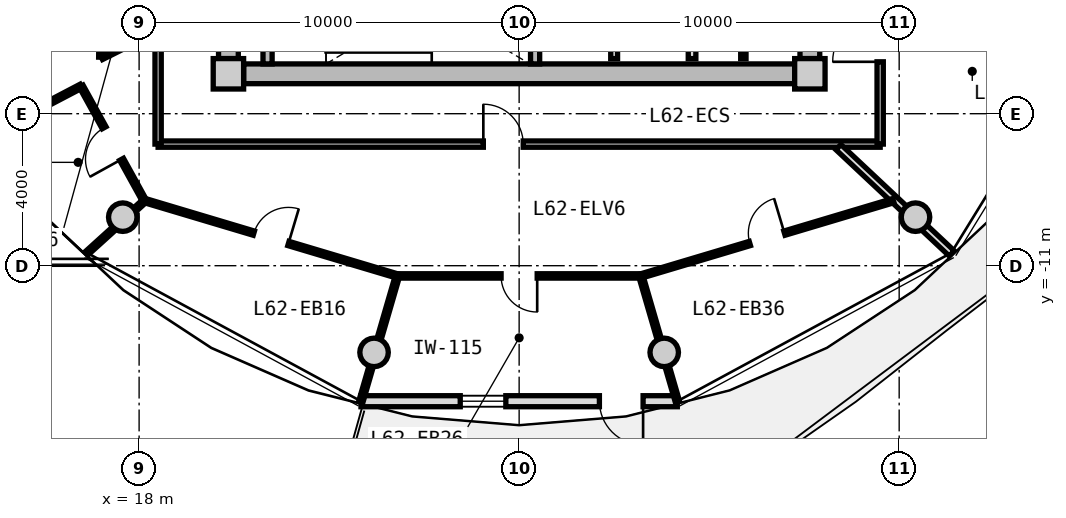
"""IFC4 building model, lengths in metres.
Left out: names, types, materials, properties, quantities, classifications, styles, units other than length and angle.
Written with IfcOpenShell. Run it as: python <this file> out.ifc"""

import sys

from ifc_helpers import new_model, si_unit, direction, frame, frame_2d, origin, origin_2d, place, context, subcontext, project, spatial, rectangle, circle, extrude, source, transform, mapped, element, fill, save


model = new_model("IFC4")
c1 = context("Model", 3, precision=1e-05, world=origin(), true_north=direction((0.0, 1.0)))
c2 = subcontext(c1, "Body", "Model", "MODEL_VIEW")
j1 = project(units=[si_unit("LENGTHUNIT", "METRE"), si_unit("PLANEANGLEUNIT", "RADIAN")], contexts=[c1])
p1 = place(None, origin())
s1 = spatial("IfcSite", under=j1, at=p1, CompositionType="ELEMENT")
p2 = place(p1, origin())
s2 = spatial("IfcBuilding", under=s1, at=p2, CompositionType="ELEMENT")
p3 = place(p2, frame((0.0, 0.0, 199.8)))
s3 = spatial("IfcBuildingStorey", under=s2, at=p3, CompositionType="ELEMENT", Elevation=199.8)
m1 = source(origin(), c2, "Body", "SweptSolid", [
    extrude(rectangle(XDim=0.8, YDim=0.8, at=origin_2d()), origin(), (0.0, 0.0, 1.0), 4.0),
])
for number, where, z_axis, x_axis in (
    (1, (20.35, -5.95, 0.0), (0.0, 0.0, 1.0), (1.0, 0.0, 0.0)),
    (2, (35.65, -5.95, 0.0), (0.0, 0.0, 1.0), (1.0, 0.0, 0.0)),
):
    element("IfcColumn", number, at=place(p3, frame(where, z_axis=z_axis, x_axis=x_axis)), inside=s3, PredefinedType="COLUMN", context=c2, shape_type="MappedRepresentation", body=[
        mapped(m1, transform((0.0, 0.0, 0.0), x_axis=(1.0, 0.0, 0.0), y_axis=(0.0, 1.0, 0.0), z_axis=(0.0, 0.0, 1.0), scale=1.0)),
    ])
m2 = source(origin(), c2, "Body", "SweptSolid", [
    extrude(rectangle(XDim=14.5, YDim=0.52, at=frame_2d((7.25, 0.0))), origin(), (0.0, 0.0, 1.0), 3.71),
])
p4 = place(p3, frame((35.25, -5.95, 0.0), z_axis=(0.0, 0.0, 1.0), x_axis=(-1.0, 0.0, 0.0)))
e3 = element("IfcWall", 3, at=p4, inside=s3, PredefinedType="SHEAR", context=c2, shape_type="MappedRepresentation", body=[
    mapped(m2, transform((0.0, 0.0, 0.0), x_axis=(1.0, 0.0, 0.0), y_axis=(0.0, 1.0, 0.0), z_axis=(0.0, 0.0, 1.0), scale=1.0)),
])
m3 = source(origin(), c2, "Body", "SweptSolid", [
    extrude(rectangle(XDim=11.1, YDim=0.52, at=frame_2d((5.55, 0.0))), origin(), (0.0, 0.0, 1.0), 3.71),
])
p5 = place(p3, frame((20.35, -5.55, 0.0), z_axis=(0.0, 0.0, 1.0), x_axis=(0.0, 1.0, 0.0)))
e4 = element("IfcWall", 4, at=p5, inside=s3, PredefinedType="SHEAR", context=c2, shape_type="MappedRepresentation", body=[
    mapped(m3, transform((0.0, 0.0, 0.0), x_axis=(1.0, 0.0, 0.0), y_axis=(0.0, 1.0, 0.0), z_axis=(0.0, 0.0, 1.0), scale=1.0)),
])
p6 = place(p5, frame((3.8, 0.0, 0.0)))
e5 = element("IfcOpeningElement", 5, at=p6, cuts=e4, PredefinedType="OPENING", context=c2, shape_type="SweptSolid", body=[
    extrude(rectangle(XDim=1.2, YDim=2.15, at=frame_2d((0.6, 1.075))), frame((0.0, 0.27, 0.0), z_axis=(0.0, -1.0, 0.0), x_axis=(1.0, 0.0, 0.0)), (0.0, 0.0, 1.0), 0.54),
])
p7 = place(p3, frame((35.65, 5.55, 0.0), z_axis=(0.0, 0.0, 1.0), x_axis=(0.0, -1.0, 0.0)))
e6 = element("IfcWall", 6, at=p7, inside=s3, PredefinedType="SHEAR", context=c2, shape_type="MappedRepresentation", body=[
    mapped(m3, transform((0.0, 0.0, 0.0), x_axis=(1.0, 0.0, 0.0), y_axis=(0.0, 1.0, 0.0), z_axis=(0.0, 0.0, 1.0), scale=1.0)),
])
p8 = place(p7, frame((5.65, 0.0, 0.0)))
e7 = element("IfcOpeningElement", 7, at=p8, cuts=e6, PredefinedType="OPENING", context=c2, shape_type="SweptSolid", body=[
    extrude(rectangle(XDim=1.2, YDim=2.15, at=frame_2d((0.6, 1.075))), frame((0.0, 0.27, 0.0), z_axis=(0.0, -1.0, 0.0), x_axis=(1.0, 0.0, 0.0)), (0.0, 0.0, 1.0), 0.54),
])
m4 = source(origin(), c2, "Body", "SweptSolid", [
    extrude(circle(Radius=0.375, at=origin_2d()), origin(), (0.0, 0.0, 1.0), 4.0),
])
for number, where, z_axis, x_axis in (
    (8, (17.57, -9.723, 0.0), (0.0, 0.0, 1.0), (1.0, 0.0, 0.0)),
    (9, (24.182, -13.281, 0.0), (0.0, 0.0, 1.0), (1.0, 0.0, 0.0)),
    (10, (31.818, -13.281, 0.0), (0.0, 0.0, 1.0), (1.0, 0.0, 0.0)),
    (11, (38.43, -9.723, 0.0), (0.0, 0.0, 1.0), (1.0, 0.0, 0.0)),
):
    element("IfcColumn", number, at=place(p3, frame(where, z_axis=z_axis, x_axis=x_axis)), inside=s3, PredefinedType="COLUMN", context=c2, shape_type="MappedRepresentation", body=[
        mapped(m4, transform((0.0, 0.0, 0.0), x_axis=(1.0, 0.0, 0.0), y_axis=(0.0, 1.0, 0.0), z_axis=(0.0, 0.0, 1.0), scale=1.0)),
    ])
m5 = source(origin(), c2, "Body", "SweptSolid", [
    extrude(rectangle(XDim=8.324, YDim=0.29, at=frame_2d((4.162, 0.0))), origin(), (0.0, 0.0, 1.0), 3.71),
])
p9 = place(p3, frame((32.162, -14.566, 0.0), z_axis=(0.0, 0.0, 1.0), x_axis=(-1.0, 0.0, 0.0)))
e12 = element("IfcWall", 12, at=p9, inside=s3, PredefinedType="SOLIDWALL", context=c2, shape_type="MappedRepresentation", body=[
    mapped(m5, transform((0.0, 0.0, 0.0), x_axis=(1.0, 0.0, 0.0), y_axis=(0.0, 1.0, 0.0), z_axis=(0.0, 0.0, 1.0), scale=1.0)),
])
p10 = place(p9, frame((0.9, 0.0, 0.0)))
e13 = element("IfcOpeningElement", 13, at=p10, cuts=e12, PredefinedType="OPENING", context=c2, shape_type="SweptSolid", body=[
    extrude(rectangle(XDim=1.15, YDim=2.25, at=frame_2d((0.575, 1.125))), frame((0.0, 0.155, 0.0), z_axis=(0.0, -1.0, 0.0), x_axis=(1.0, 0.0, 0.0)), (0.0, 0.0, 1.0), 0.31),
])
p11 = place(p9, frame((4.512, 0.0, 0.85)))
e14 = element("IfcOpeningElement", 14, at=p11, cuts=e12, PredefinedType="OPENING", context=c2, shape_type="SweptSolid", body=[
    extrude(rectangle(XDim=1.2, YDim=1.5, at=frame_2d((0.6, 0.75))), frame((0.0, 0.155, 0.0), z_axis=(0.0, -1.0, 0.0), x_axis=(1.0, 0.0, 0.0)), (0.0, 0.0, 1.0), 0.31),
])
m6 = source(origin(), c2, "Body", "SweptSolid", [
    extrude(rectangle(XDim=3.24, YDim=0.24, at=frame_2d((1.62, 0.0))), origin(), (0.0, 0.0, 1.0), 3.71),
])
for number, where, z_axis, x_axis in (
    (15, (21.38, -5.69, 0.0), (0.0, 0.0, 1.0), (0.0, 1.0, 0.0)),
    (16, (28.42, -5.69, 0.0), (0.0, 0.0, 1.0), (0.0, 1.0, 0.0)),
):
    element("IfcWall", number, at=place(p3, frame(where, z_axis=z_axis, x_axis=x_axis)), inside=s3, PredefinedType="PARTITIONING", context=c2, shape_type="MappedRepresentation", body=[
        mapped(m6, transform((0.0, 0.0, 0.0), x_axis=(1.0, 0.0, 0.0), y_axis=(0.0, 1.0, 0.0), z_axis=(0.0, 0.0, 1.0), scale=1.0)),
    ])
m7 = source(origin(), c2, "Body", "SweptSolid", [
    extrude(rectangle(XDim=3.8, YDim=0.2, at=frame_2d((1.9, 0.0))), origin(), (0.0, 0.0, 1.0), 3.695),
])
p12 = place(p3, frame((32.55, -5.55, 0.0), z_axis=(0.0, 0.0, 1.0), x_axis=(0.0, 1.0, 0.0)))
e17 = element("IfcWall", 17, at=p12, inside=s3, PredefinedType="PARTITIONING", context=c2, shape_type="MappedRepresentation", body=[
    mapped(m7, transform((0.0, 0.0, 0.0), x_axis=(1.0, 0.0, 0.0), y_axis=(0.0, 1.0, 0.0), z_axis=(0.0, 0.0, 1.0), scale=1.0)),
])
m8 = source(origin(), c2, "Body", "SweptSolid", [
    extrude(rectangle(XDim=4.2, YDim=0.18, at=frame_2d((2.1, 0.0))), origin(), (0.0, 0.0, 1.0), 3.695),
])
p13 = place(p3, frame((30.5, -5.55, 0.0), z_axis=(0.0, 0.0, 1.0), x_axis=(0.0, 1.0, 0.0)))
e18 = element("IfcWall", 18, at=p13, inside=s3, PredefinedType="PARTITIONING", context=c2, shape_type="MappedRepresentation", body=[
    mapped(m8, transform((0.0, 0.0, 0.0), x_axis=(1.0, 0.0, 0.0), y_axis=(0.0, 1.0, 0.0), z_axis=(0.0, 0.0, 1.0), scale=1.0)),
])
m9 = source(origin(), c2, "Body", "SweptSolid", [
    extrude(rectangle(XDim=3.8, YDim=0.14, at=frame_2d((1.9, 0.0))), origin(), (0.0, 0.0, 1.0), 3.695),
])
p14 = place(p3, frame((33.9, -5.55, 0.0), z_axis=(0.0, 0.0, 1.0), x_axis=(0.0, 1.0, 0.0)))
e19 = element("IfcWall", 19, at=p14, inside=s3, PredefinedType="PARTITIONING", context=c2, shape_type="MappedRepresentation", body=[
    mapped(m9, transform((0.0, 0.0, 0.0), x_axis=(1.0, 0.0, 0.0), y_axis=(0.0, 1.0, 0.0), z_axis=(0.0, 0.0, 1.0), scale=1.0)),
])
m10 = source(origin(), c2, "Body", "SweptSolid", [
    extrude(rectangle(XDim=19.0, YDim=0.165, at=frame_2d((9.5, 0.0))), origin(), (0.0, 0.0, 1.0), 3.695),
])
p15 = place(p3, frame((37.5, -7.8, 0.0), z_axis=(0.0, 0.0, 1.0), x_axis=(-1.0, 0.0, 0.0)))
e20 = element("IfcWall", 20, at=p15, inside=s3, PredefinedType="PARTITIONING", context=c2, shape_type="MappedRepresentation", body=[
    mapped(m10, transform((0.0, 0.0, 0.0), x_axis=(1.0, 0.0, 0.0), y_axis=(0.0, 1.0, 0.0), z_axis=(0.0, 0.0, 1.0), scale=1.0)),
])
p16 = place(p15, frame((9.392, 0.0, 0.0)))
e21 = element("IfcOpeningElement", 21, at=p16, cuts=e20, PredefinedType="OPENING", context=c2, shape_type="SweptSolid", body=[
    extrude(rectangle(XDim=1.05, YDim=2.15, at=frame_2d((0.525, 1.075))), frame((0.0, 0.093, 0.0), z_axis=(0.0, -1.0, 0.0), x_axis=(1.0, 0.0, 0.0)), (0.0, 0.0, 1.0), 0.185),
])
m11 = source(origin(), c2, "Body", "SweptSolid", [
    extrude(rectangle(XDim=6.88, YDim=0.165, at=frame_2d((3.44, 0.0))), origin(), (0.0, 0.0, 1.0), 3.695),
])
p17 = place(p3, frame((18.5, -7.8, 0.0), z_axis=(0.0, 0.0, 1.0), x_axis=(0.0, 1.0, 0.0)))
e22 = element("IfcWall", 22, at=p17, inside=s3, PredefinedType="PARTITIONING", context=c2, shape_type="MappedRepresentation", body=[
    mapped(m11, transform((0.0, 0.0, 0.0), x_axis=(1.0, 0.0, 0.0), y_axis=(0.0, 1.0, 0.0), z_axis=(0.0, 0.0, 1.0), scale=1.0)),
])
p18 = place(p3, frame((37.5, -0.92, 0.0), z_axis=(0.0, 0.0, 1.0), x_axis=(0.0, -1.0, 0.0)))
e23 = element("IfcWall", 23, at=p18, inside=s3, PredefinedType="PARTITIONING", context=c2, shape_type="MappedRepresentation", body=[
    mapped(m11, transform((0.0, 0.0, 0.0), x_axis=(1.0, 0.0, 0.0), y_axis=(0.0, 1.0, 0.0), z_axis=(0.0, 0.0, 1.0), scale=1.0)),
])
p19 = place(p18, frame((3.464, 0.0, 0.0)))
e24 = element("IfcOpeningElement", 24, at=p19, cuts=e23, PredefinedType="OPENING", context=c2, shape_type="SweptSolid", body=[
    extrude(rectangle(XDim=1.25, YDim=2.2, at=frame_2d((0.625, 1.1))), frame((0.0, 0.093, 0.0), z_axis=(0.0, -1.0, 0.0), x_axis=(1.0, 0.0, 0.0)), (0.0, 0.0, 1.0), 0.185),
])
m12 = source(origin(), c2, "Body", "SweptSolid", [
    extrude(rectangle(XDim=4.089, YDim=0.19, at=frame_2d((2.044, 0.0))), origin(), (0.0, 0.0, 1.0), 3.295),
])
p20 = place(p3, frame((36.402, -7.88, 0.0), z_axis=(0.0, 0.0, 1.0), x_axis=(0.729401273609, -0.684086092577, 0.0)))
e25 = element("IfcWall", 25, at=p20, inside=s3, PredefinedType="PARTITIONING", context=c2, shape_type="MappedRepresentation", body=[
    mapped(m12, transform((0.0, 0.0, 0.0), x_axis=(1.0, 0.0, 0.0), y_axis=(0.0, 1.0, 0.0), z_axis=(0.0, 0.0, 1.0), scale=1.0)),
])
m13 = source(origin(), c2, "Body", "SweptSolid", [
    extrude(rectangle(XDim=6.936, YDim=0.115, at=frame_2d((3.468, 0.0))), origin(), (0.0, 0.0, 1.0), 3.695),
])
p21 = place(p3, frame((18.151, -9.287, 0.0), z_axis=(0.0, 0.0, 1.0), x_axis=(0.958186895835, -0.286143098205, 0.0)))
e26 = element("IfcWall", 26, at=p21, inside=s3, PredefinedType="PARTITIONING", context=c2, shape_type="MappedRepresentation", body=[
    mapped(m13, transform((0.0, 0.0, 0.0), x_axis=(1.0, 0.0, 0.0), y_axis=(0.0, 1.0, 0.0), z_axis=(0.0, 0.0, 1.0), scale=1.0)),
])
p22 = place(p21, frame((2.993, 0.0, 0.0)))
e27 = element("IfcOpeningElement", 27, at=p22, cuts=e26, PredefinedType="OPENING", context=c2, shape_type="SweptSolid", body=[
    extrude(rectangle(XDim=0.95, YDim=2.1, at=frame_2d((0.475, 1.05))), frame((0.0, 0.067, 0.0), z_axis=(0.0, -1.0, 0.0), x_axis=(1.0, 0.0, 0.0)), (0.0, 0.0, 1.0), 0.135),
])
m14 = source(origin(), c2, "Body", "SweptSolid", [
    extrude(rectangle(XDim=2.072, YDim=0.115, at=frame_2d((1.036, 0.0))), origin(), (0.0, 0.0, 1.0), 3.295),
])
p23 = place(p3, frame((18.151, -9.287, 0.0), z_axis=(0.0, 0.0, 1.0), x_axis=(-0.741410125356, -0.671052178314, 0.0)))
e28 = element("IfcWall", 28, at=p23, inside=s3, PredefinedType="PARTITIONING", context=c2, shape_type="MappedRepresentation", body=[
    mapped(m14, transform((0.0, 0.0, 0.0), x_axis=(1.0, 0.0, 0.0), y_axis=(0.0, 1.0, 0.0), z_axis=(0.0, 0.0, 1.0), scale=1.0)),
])
m15 = source(origin(), c2, "Body", "SweptSolid", [
    extrude(rectangle(XDim=6.404, YDim=0.115, at=frame_2d((3.202, 0.0))), origin(), (0.0, 0.0, 1.0), 3.695),
])
p24 = place(p3, frame((24.798, -11.269, 0.0), z_axis=(0.0, 0.0, 1.0), x_axis=(1.0, 0.0, 0.0)))
e29 = element("IfcWall", 29, at=p24, inside=s3, PredefinedType="PARTITIONING", context=c2, shape_type="MappedRepresentation", body=[
    mapped(m15, transform((0.0, 0.0, 0.0), x_axis=(1.0, 0.0, 0.0), y_axis=(0.0, 1.0, 0.0), z_axis=(0.0, 0.0, 1.0), scale=1.0)),
])
p25 = place(p24, frame((2.727, 0.0, 0.0)))
e30 = element("IfcOpeningElement", 30, at=p25, cuts=e29, PredefinedType="OPENING", context=c2, shape_type="SweptSolid", body=[
    extrude(rectangle(XDim=0.95, YDim=2.1, at=frame_2d((0.475, 1.05))), frame((0.0, 0.067, 0.0), z_axis=(0.0, -1.0, 0.0), x_axis=(1.0, 0.0, 0.0)), (0.0, 0.0, 1.0), 0.135),
])
m16 = source(origin(), c2, "Body", "SweptSolid", [
    extrude(rectangle(XDim=3.454, YDim=0.115, at=frame_2d((1.727, 0.0))), origin(), (0.0, 0.0, 1.0), 3.295),
])
p26 = place(p3, frame((24.798, -11.269, 0.0), z_axis=(0.0, 0.0, 1.0), x_axis=(-0.279348499358, -0.960189781193, 0.0)))
e31 = element("IfcWall", 31, at=p26, inside=s3, PredefinedType="PARTITIONING", context=c2, shape_type="MappedRepresentation", body=[
    mapped(m16, transform((0.0, 0.0, 0.0), x_axis=(1.0, 0.0, 0.0), y_axis=(0.0, 1.0, 0.0), z_axis=(0.0, 0.0, 1.0), scale=1.0)),
])
p27 = place(p3, frame((31.203, -11.272, 0.0), z_axis=(0.0, 0.0, 1.0), x_axis=(0.958186895835, 0.286143098205, 0.0)))
e32 = element("IfcWall", 32, at=p27, inside=s3, PredefinedType="PARTITIONING", context=c2, shape_type="MappedRepresentation", body=[
    mapped(m13, transform((0.0, 0.0, 0.0), x_axis=(1.0, 0.0, 0.0), y_axis=(0.0, 1.0, 0.0), z_axis=(0.0, 0.0, 1.0), scale=1.0)),
])
p28 = place(p27, frame((2.993, 0.0, 0.0)))
e33 = element("IfcOpeningElement", 33, at=p28, cuts=e32, PredefinedType="OPENING", context=c2, shape_type="SweptSolid", body=[
    extrude(rectangle(XDim=0.95, YDim=2.1, at=frame_2d((0.475, 1.05))), frame((0.0, 0.067, 0.0), z_axis=(0.0, -1.0, 0.0), x_axis=(1.0, 0.0, 0.0)), (0.0, 0.0, 1.0), 0.135),
])
m17 = source(origin(), c2, "Body", "SweptSolid", [
    extrude(rectangle(XDim=3.451, YDim=0.115, at=frame_2d((1.726, 0.0))), origin(), (0.0, 0.0, 1.0), 3.295),
])
p29 = place(p3, frame((31.203, -11.272, 0.0), z_axis=(0.0, 0.0, 1.0), x_axis=(0.279361559083, -0.960185981624, 0.0)))
e34 = element("IfcWall", 34, at=p29, inside=s3, PredefinedType="PARTITIONING", context=c2, shape_type="MappedRepresentation", body=[
    mapped(m17, transform((0.0, 0.0, 0.0), x_axis=(1.0, 0.0, 0.0), y_axis=(0.0, 1.0, 0.0), z_axis=(0.0, 0.0, 1.0), scale=1.0)),
])
m18 = source(origin(), c2, "Body", "SweptSolid", [
    extrude(rectangle(XDim=1.638, YDim=0.14, at=frame_2d((0.819, 0.0))), origin(), (0.0, 0.0, 1.0), 3.695),
])
p30 = place(p3, frame((18.47, -4.778, 0.0), z_axis=(0.0, 0.0, 1.0), x_axis=(-0.893919977945, -0.448226586707, 0.0)))
e35 = element("IfcWall", 35, at=p30, inside=s3, PredefinedType="PARTITIONING", context=c2, shape_type="MappedRepresentation", body=[
    mapped(m18, transform((0.0, 0.0, 0.0), x_axis=(1.0, 0.0, 0.0), y_axis=(0.0, 1.0, 0.0), z_axis=(0.0, 0.0, 1.0), scale=1.0)),
])
m19 = source(origin(), c2, "Body", "SweptSolid", [
    extrude(rectangle(XDim=2.759, YDim=0.14, at=frame_2d((1.379, 0.0))), origin(), (0.0, 0.0, 1.0), 3.695),
])
p31 = place(p3, frame((17.005, -5.513, 0.0), z_axis=(0.0, 0.0, 1.0), x_axis=(0.01194710728, 0.999928630767, 0.0)))
e36 = element("IfcWall", 36, at=p31, inside=s3, PredefinedType="PARTITIONING", context=c2, shape_type="MappedRepresentation", body=[
    mapped(m19, transform((0.0, 0.0, 0.0), x_axis=(1.0, 0.0, 0.0), y_axis=(0.0, 1.0, 0.0), z_axis=(0.0, 0.0, 1.0), scale=1.0)),
])
p32 = place(p31, frame((0.919, 0.0, 0.0)))
e37 = element("IfcOpeningElement", 37, at=p32, cuts=e36, PredefinedType="OPENING", context=c2, shape_type="SweptSolid", body=[
    extrude(rectangle(XDim=0.92, YDim=2.1, at=frame_2d((0.46, 1.05))), frame((0.0, 0.08, 0.0), z_axis=(0.0, -1.0, 0.0), x_axis=(1.0, 0.0, 0.0)), (0.0, 0.0, 1.0), 0.16),
])
m20 = source(origin(), c2, "Body", "SweptSolid", [
    extrude(rectangle(XDim=2.193, YDim=0.115, at=frame_2d((1.097, 0.0))), origin(), (0.0, 0.0, 1.0), 3.695),
])
p33 = place(p3, frame((16.475, -6.275, 0.0), z_axis=(0.0, 0.0, 1.0), x_axis=(-0.885783595046, -0.464098505435, 0.0)))
e38 = element("IfcWall", 38, at=p33, inside=s3, PredefinedType="PARTITIONING", context=c2, shape_type="MappedRepresentation", body=[
    mapped(m20, transform((0.0, 0.0, 0.0), x_axis=(1.0, 0.0, 0.0), y_axis=(0.0, 1.0, 0.0), z_axis=(0.0, 0.0, 1.0), scale=1.0)),
])
m21 = source(origin(), c2, "Body", "SweptSolid", [
    extrude(rectangle(XDim=3.45, YDim=0.115, at=frame_2d((1.725, 0.0))), origin(), (0.0, 0.0, 1.0), 3.695),
])
p34 = place(p3, frame((16.475, -6.275, 0.0), z_axis=(0.0, 0.0, 1.0), x_axis=(0.483659007882, -0.875256513312, 0.0)))
e39 = element("IfcWall", 39, at=p34, inside=s3, PredefinedType="PARTITIONING", context=c2, shape_type="MappedRepresentation", body=[
    mapped(m21, transform((0.0, 0.0, 0.0), x_axis=(1.0, 0.0, 0.0), y_axis=(0.0, 1.0, 0.0), z_axis=(0.0, 0.0, 1.0), scale=1.0)),
])
p35 = place(p34, frame((1.25, 0.0, 0.0)))
e40 = element("IfcOpeningElement", 40, at=p35, cuts=e39, PredefinedType="OPENING", context=c2, shape_type="SweptSolid", body=[
    extrude(rectangle(XDim=0.95, YDim=2.1, at=frame_2d((0.475, 1.05))), frame((0.0, 0.067, 0.0), z_axis=(0.0, -1.0, 0.0), x_axis=(1.0, 0.0, 0.0)), (0.0, 0.0, 1.0), 0.135),
])
m22 = source(origin(), c2, "Body", "SweptSolid", [
    extrude(rectangle(XDim=1.15, YDim=2.25, at=frame_2d((0.575, 1.125))), frame((0.0, 0.025, 0.0), z_axis=(0.0, -1.0, 0.0), x_axis=(1.0, 0.0, 0.0)), (0.0, 0.0, 1.0), 0.05),
])
p36 = place(p10, origin())
e41 = element("IfcDoor", 41, at=p36, inside=s3, OperationType="SINGLE_SWING_LEFT", PredefinedType="DOOR", context=c2, shape_type="MappedRepresentation", body=[
    mapped(m22, transform((0.0, 0.0, 0.0), x_axis=(1.0, 0.0, 0.0), y_axis=(0.0, 1.0, 0.0), z_axis=(0.0, 0.0, 1.0), scale=1.0)),
])
fill(e13, e41)
m23 = source(origin(), c2, "Body", "SweptSolid", [
    extrude(rectangle(XDim=1.2, YDim=1.5, at=frame_2d((0.6, 0.75))), frame((0.0, 0.03, 0.0), z_axis=(0.0, -1.0, 0.0), x_axis=(1.0, 0.0, 0.0)), (0.0, 0.0, 1.0), 0.06),
])
p37 = place(p11, origin())
e42 = element("IfcWindow", 42, at=p37, inside=s3, PartitioningType="SINGLE_PANEL", PredefinedType="WINDOW", context=c2, shape_type="MappedRepresentation", body=[
    mapped(m23, transform((0.0, 0.0, 0.0), x_axis=(1.0, 0.0, 0.0), y_axis=(0.0, 1.0, 0.0), z_axis=(0.0, 0.0, 1.0), scale=1.0)),
])
fill(e14, e42)
m24 = source(origin(), c2, "Body", "SweptSolid", [
    extrude(rectangle(XDim=1.05, YDim=2.15, at=frame_2d((0.525, 1.075))), frame((0.0, 0.025, 0.0), z_axis=(0.0, -1.0, 0.0), x_axis=(1.0, 0.0, 0.0)), (0.0, 0.0, 1.0), 0.05),
])
p38 = place(p16, frame((1.05, 0.0, 0.0), z_axis=(0.0, 0.0, 1.0), x_axis=(-1.0, 0.0, 0.0)))
e43 = element("IfcDoor", 43, at=p38, inside=s3, OperationType="SINGLE_SWING_LEFT", PredefinedType="DOOR", context=c2, shape_type="MappedRepresentation", body=[
    mapped(m24, transform((0.0, 0.0, 0.0), x_axis=(1.0, 0.0, 0.0), y_axis=(0.0, 1.0, 0.0), z_axis=(0.0, 0.0, 1.0), scale=1.0)),
])
fill(e21, e43)
m25 = source(origin(), c2, "Body", "SweptSolid", [
    extrude(rectangle(XDim=0.95, YDim=2.1, at=frame_2d((0.475, 1.05))), frame((0.0, 0.025, 0.0), z_axis=(0.0, -1.0, 0.0), x_axis=(1.0, 0.0, 0.0)), (0.0, 0.0, 1.0), 0.05),
])
p39 = place(p35, frame((0.95, 0.0, 0.0), z_axis=(0.0, 0.0, 1.0), x_axis=(-1.0, 0.0, 0.0)))
e44 = element("IfcDoor", 44, at=p39, inside=s3, OperationType="SINGLE_SWING_LEFT", PredefinedType="DOOR", context=c2, shape_type="MappedRepresentation", body=[
    mapped(m25, transform((0.0, 0.0, 0.0), x_axis=(1.0, 0.0, 0.0), y_axis=(0.0, 1.0, 0.0), z_axis=(0.0, 0.0, 1.0), scale=1.0)),
])
fill(e40, e44)
p40 = place(p22, origin())
e45 = element("IfcDoor", 45, at=p40, inside=s3, OperationType="SINGLE_SWING_RIGHT", PredefinedType="DOOR", context=c2, shape_type="MappedRepresentation", body=[
    mapped(m25, transform((0.0, 0.0, 0.0), x_axis=(1.0, 0.0, 0.0), y_axis=(0.0, 1.0, 0.0), z_axis=(0.0, 0.0, 1.0), scale=1.0)),
])
fill(e27, e45)
p41 = place(p25, frame((0.95, 0.0, 0.0), z_axis=(0.0, 0.0, 1.0), x_axis=(-1.0, 0.0, 0.0)))
e46 = element("IfcDoor", 46, at=p41, inside=s3, OperationType="SINGLE_SWING_LEFT", PredefinedType="DOOR", context=c2, shape_type="MappedRepresentation", body=[
    mapped(m25, transform((0.0, 0.0, 0.0), x_axis=(1.0, 0.0, 0.0), y_axis=(0.0, 1.0, 0.0), z_axis=(0.0, 0.0, 1.0), scale=1.0)),
])
fill(e30, e46)
p42 = place(p28, origin())
e47 = element("IfcDoor", 47, at=p42, inside=s3, OperationType="SINGLE_SWING_RIGHT", PredefinedType="DOOR", context=c2, shape_type="MappedRepresentation", body=[
    mapped(m25, transform((0.0, 0.0, 0.0), x_axis=(1.0, 0.0, 0.0), y_axis=(0.0, 1.0, 0.0), z_axis=(0.0, 0.0, 1.0), scale=1.0)),
])
fill(e33, e47)
m26 = source(origin(), c2, "Body", "SweptSolid", [
    extrude(rectangle(XDim=1.25, YDim=2.2, at=frame_2d((0.625, 1.1))), frame((0.0, 0.025, 0.0), z_axis=(0.0, -1.0, 0.0), x_axis=(1.0, 0.0, 0.0)), (0.0, 0.0, 1.0), 0.05),
])
p43 = place(p19, frame((1.25, 0.0, 0.0), z_axis=(0.0, 0.0, 1.0), x_axis=(-1.0, 0.0, 0.0)))
e48 = element("IfcDoor", 48, at=p43, inside=s3, OperationType="SINGLE_SWING_LEFT", PredefinedType="DOOR", context=c2, shape_type="MappedRepresentation", body=[
    mapped(m26, transform((0.0, 0.0, 0.0), x_axis=(1.0, 0.0, 0.0), y_axis=(0.0, 1.0, 0.0), z_axis=(0.0, 0.0, 1.0), scale=1.0)),
])
fill(e24, e48)
save(model, sys.argv[1])
